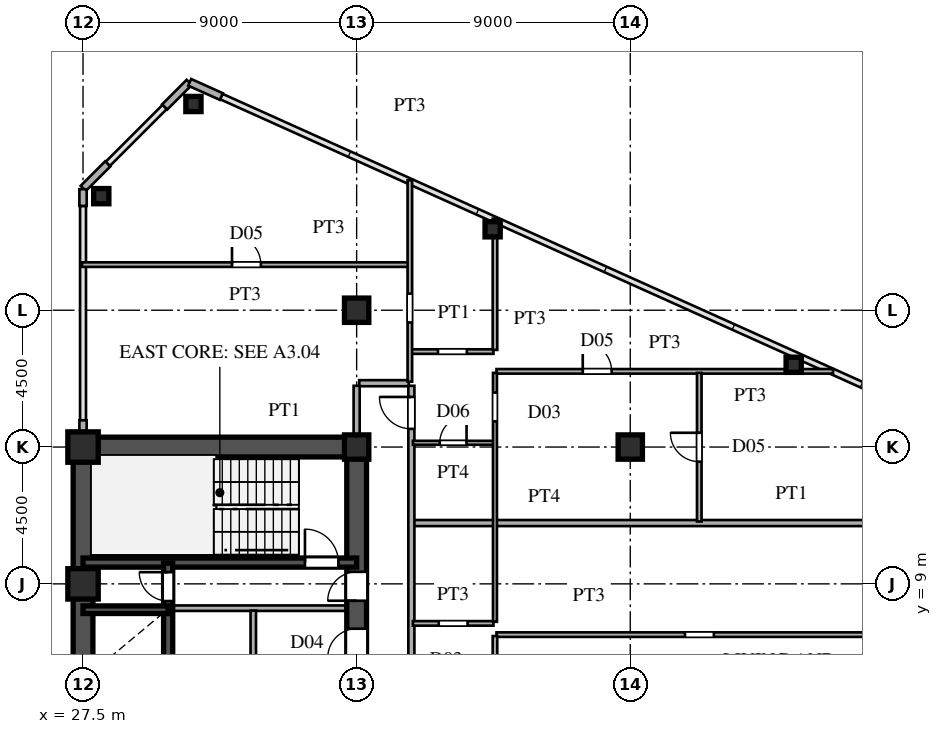
"""IFC4 building model, lengths in metres.
Left out: names, types, materials, properties, quantities, classifications, styles, units other than length and angle.
Written with IfcOpenShell. Run it as: python <this file> out.ifc"""

import sys

from ifc_helpers import new_model, si_unit, direction, frame, frame_2d, origin, origin_2d, place, context, subcontext, project, spatial, rectangle, hollow_rectangle, i_section, extrude, source, transform, mapped, element, fill, save


model = new_model("IFC4")
c1 = context("Model", 3, precision=1e-05, world=origin(), true_north=direction((0.0, 1.0)))
c2 = subcontext(c1, "Body", "Model", "MODEL_VIEW")
j1 = project(units=[si_unit("LENGTHUNIT", "METRE"), si_unit("PLANEANGLEUNIT", "RADIAN")], contexts=[c1])
p1 = place(None, origin())
s1 = spatial("IfcSite", under=j1, at=p1, CompositionType="ELEMENT")
p2 = place(p1, origin())
s2 = spatial("IfcBuilding", under=s1, at=p2, CompositionType="ELEMENT")
p3 = place(p2, frame((0.0, 0.0, 80.1)))
s3 = spatial("IfcBuildingStorey", under=s2, at=p3, CompositionType="ELEMENT", Elevation=80.1)
m1 = source(origin(), c2, "Body", "SweptSolid", [
    extrude(hollow_rectangle(XDim=1.0, YDim=1.0, WallThickness=0.042, at=origin_2d()), origin(), (0.0, 0.0, 1.0), 3.6),
])
for number, where, z_axis, x_axis in (
    (1, (27.5, 9.0, 0.0), (0.0, 0.0, 1.0), (1.0, 0.0, 0.0)),
    (2, (27.5, 13.5, 0.0), (0.0, 0.0, 1.0), (1.0, 0.0, 0.0)),
):
    element("IfcColumn", number, at=place(p3, frame(where, z_axis=z_axis, x_axis=x_axis)), inside=s3, PredefinedType="COLUMN", context=c2, shape_type="MappedRepresentation", body=[
        mapped(m1, transform((0.0, 0.0, 0.0), scale=1.0)),
    ])
m2 = source(origin(), c2, "Body", "SweptSolid", [
    extrude(i_section(OverallWidth=0.8, OverallDepth=0.8, WebThickness=0.032, FlangeThickness=0.05, at=origin_2d()), origin(), (0.0, 0.0, 1.0), 3.6),
])
for number, where, z_axis, x_axis in (
    (3, (36.5, 13.5, 0.0), (0.0, 0.0, 1.0), (1.0, 0.0, 0.0)),
    (4, (36.5, 18.0, 0.0), (0.0, 0.0, 1.0), (1.0, 0.0, 0.0)),
    (5, (45.5, 13.5, 0.0), (0.0, 0.0, 1.0), (1.0, 0.0, 0.0)),
):
    element("IfcColumn", number, at=place(p3, frame(where, z_axis=z_axis, x_axis=x_axis)), inside=s3, PredefinedType="COLUMN", context=c2, shape_type="MappedRepresentation", body=[
        mapped(m2, transform((0.0, 0.0, 0.0), scale=1.0)),
    ])
m3 = source(origin(), c2, "Body", "SweptSolid", [
    extrude(hollow_rectangle(XDim=0.5, YDim=0.5, WallThickness=0.02, at=origin_2d()), origin(), (0.0, 0.0, 1.0), 3.6),
])
for number, where, z_axis, x_axis in (
    (6, (31.131, 24.783, 0.0), (0.0, 0.0, 1.0), (1.0, 0.0, 0.0)),
    (7, (28.1, 21.751, 0.0), (0.0, 0.0, 1.0), (1.0, 0.0, 0.0)),
    (8, (40.973, 20.661, 0.0), (0.0, 0.0, 1.0), (1.0, 0.0, 0.0)),
    (9, (50.875, 16.205, 0.0), (0.0, 0.0, 1.0), (1.0, 0.0, 0.0)),
):
    element("IfcColumn", number, at=place(p3, frame(where, z_axis=z_axis, x_axis=x_axis)), inside=s3, PredefinedType="COLUMN", context=c2, shape_type="MappedRepresentation", body=[
        mapped(m3, transform((0.0, 0.0, 0.0), scale=1.0)),
    ])
p4 = place(p3, frame((32.049, 25.028, 0.0), z_axis=(0.0, 0.0, 1.0), x_axis=(-0.911929519623, 0.410346866979, 0.0)))
e10 = element("IfcWall", 10, at=p4, inside=s3, PredefinedType="SOLIDWALL", context=c2, shape_type="SweptSolid", body=[
    extrude(rectangle(XDim=1.14, YDim=0.24, at=frame_2d((0.57, 0.0))), origin(), (0.0, 0.0, 1.0), 3.38),
])
for number, where, z_axis, x_axis in (
    (11, (30.993, 25.493, 0.0), (0.0, 0.0, 1.0), (-0.707, -0.707, 0.0)),
    (12, (28.313, 22.813, 0.0), (0.0, 0.0, 1.0), (-0.707, -0.707, 0.0)),
):
    element("IfcWall", number, at=place(p3, frame(where, z_axis=z_axis, x_axis=x_axis)), inside=s3, PredefinedType="SOLIDWALL", context=c2, shape_type="SweptSolid", body=[
        extrude(rectangle(XDim=1.14, YDim=0.24, at=frame_2d((0.57, 0.0))), origin(), (0.0, 0.0, 1.0), 3.38),
    ])
p5 = place(p3, frame((27.5, 13.83, 0.0), z_axis=(0.0, 0.0, 1.0), x_axis=(0.0, 1.0, 0.0)))
e13 = element("IfcWall", 13, at=p5, inside=s3, PredefinedType="SOLIDWALL", context=c2, shape_type="SweptSolid", body=[
    extrude(rectangle(XDim=0.55, YDim=0.24, at=frame_2d((0.275, 0.0))), origin(), (0.0, 0.0, 1.0), 2.88),
])
p6 = place(p3, frame((27.5, 21.43, 0.0), z_axis=(0.0, 0.0, 1.0), x_axis=(0.0, 1.0, 0.0)))
e14 = element("IfcWall", 14, at=p6, inside=s3, PredefinedType="SOLIDWALL", context=c2, shape_type="SweptSolid", body=[
    extrude(rectangle(XDim=0.55, YDim=0.24, at=frame_2d((0.275, 0.0))), origin(), (0.0, 0.0, 1.0), 3.38),
])
p7 = place(p3, frame((27.5, 1.3, 0.0), z_axis=(0.0, 0.0, 1.0), x_axis=(0.0, 1.0, 0.0)))
e15 = element("IfcWall", 15, at=p7, inside=s3, PredefinedType="SHEAR", context=c2, shape_type="SweptSolid", body=[
    extrude(rectangle(XDim=12.2, YDim=0.65, at=frame_2d((6.1, 0.0))), origin(), (0.0, 0.0, 1.0), 3.38),
])
p8 = place(p3, frame((27.5, 13.5, 0.0), z_axis=(0.0, 0.0, 1.0), x_axis=(1.0, 0.0, 0.0)))
e16 = element("IfcWall", 16, at=p8, inside=s3, PredefinedType="SHEAR", context=c2, shape_type="SweptSolid", body=[
    extrude(rectangle(XDim=9.0, YDim=0.65, at=frame_2d((4.5, 0.0))), origin(), (0.0, 0.0, 1.0), 3.38),
])
p9 = place(p3, frame((36.5, 8.2, 0.0), z_axis=(0.0, 0.0, 1.0), x_axis=(0.0, 1.0, 0.0)))
e17 = element("IfcWall", 17, at=p9, inside=s3, PredefinedType="SHEAR", context=c2, shape_type="SweptSolid", body=[
    extrude(rectangle(XDim=5.45, YDim=0.65, at=frame_2d((2.725, 0.0))), origin(), (0.0, 0.0, 1.0), 3.38),
])
p10 = place(p9, frame((0.245, 0.0, 0.0)))
e18 = element("IfcOpeningElement", 18, at=p10, cuts=e17, PredefinedType="OPENING", context=c2, shape_type="SweptSolid", body=[
    extrude(rectangle(XDim=0.95, YDim=2.15, at=frame_2d((0.475, 1.075))), frame((0.0, 0.335, 0.0), z_axis=(0.0, -1.0, 0.0), x_axis=(1.0, 0.0, 0.0)), (0.0, 0.0, 1.0), 0.67),
])
p11 = place(p3, frame((36.5, 5.9, 0.0), z_axis=(0.0, 0.0, 1.0), x_axis=(0.0, 1.0, 0.0)))
e19 = element("IfcWall", 19, at=p11, inside=s3, PredefinedType="SHEAR", context=c2, shape_type="SweptSolid", body=[
    extrude(rectangle(XDim=2.3, YDim=0.65, at=frame_2d((1.15, 0.0))), origin(), (0.0, 0.0, 1.0), 3.38),
])
p12 = place(p11, frame((0.675, 0.0, 0.0)))
e20 = element("IfcOpeningElement", 20, at=p12, cuts=e19, PredefinedType="OPENING", context=c2, shape_type="SweptSolid", body=[
    extrude(rectangle(XDim=0.95, YDim=2.15, at=frame_2d((0.475, 1.075))), frame((0.0, 0.335, 0.0), z_axis=(0.0, -1.0, 0.0), x_axis=(1.0, 0.0, 0.0)), (0.0, 0.0, 1.0), 0.67),
])
p13 = place(p3, frame((27.5, 9.7, 0.0), z_axis=(0.0, 0.0, 1.0), x_axis=(1.0, 0.0, 0.0)))
e21 = element("IfcWall", 21, at=p13, inside=s3, PredefinedType="SHEAR", context=c2, shape_type="SweptSolid", body=[
    extrude(rectangle(XDim=9.0, YDim=0.3, at=frame_2d((4.5, 0.0))), origin(), (0.0, 0.0, 1.0), 3.38),
])
p14 = place(p13, frame((7.3, 0.0, 0.0)))
e22 = element("IfcOpeningElement", 22, at=p14, cuts=e21, PredefinedType="OPENING", context=c2, shape_type="SweptSolid", body=[
    extrude(rectangle(XDim=1.1, YDim=2.2, at=frame_2d((0.55, 1.1))), frame((0.0, 0.16, 0.0), z_axis=(0.0, -1.0, 0.0), x_axis=(1.0, 0.0, 0.0)), (0.0, 0.0, 1.0), 0.32),
])
p15 = place(p3, frame((27.5, 8.15, 0.0), z_axis=(0.0, 0.0, 1.0), x_axis=(1.0, 0.0, 0.0)))
e23 = element("IfcWall", 23, at=p15, inside=s3, PredefinedType="SHEAR", context=c2, shape_type="SweptSolid", body=[
    extrude(rectangle(XDim=2.8, YDim=0.25, at=frame_2d((1.4, 0.0))), origin(), (0.0, 0.0, 1.0), 3.38),
])
p16 = place(p3, frame((30.3, 5.9, 0.0), z_axis=(0.0, 0.0, 1.0), x_axis=(0.0, 1.0, 0.0)))
e24 = element("IfcWall", 24, at=p16, inside=s3, PredefinedType="SHEAR", context=c2, shape_type="SweptSolid", body=[
    extrude(rectangle(XDim=2.25, YDim=0.3, at=frame_2d((1.125, 0.0))), origin(), (0.0, 0.0, 1.0), 3.38),
])
p17 = place(p3, frame((30.3, 8.15, 0.0), z_axis=(0.0, 0.0, 1.0), x_axis=(0.0, 1.0, 0.0)))
e25 = element("IfcWall", 25, at=p17, inside=s3, PredefinedType="SHEAR", context=c2, shape_type="SweptSolid", body=[
    extrude(rectangle(XDim=1.53, YDim=0.3, at=frame_2d((0.765, 0.0))), origin(), (0.0, 0.0, 1.0), 3.38),
])
p18 = place(p17, frame((0.285, 0.0, 0.0)))
e26 = element("IfcOpeningElement", 26, at=p18, cuts=e25, PredefinedType="OPENING", context=c2, shape_type="SweptSolid", body=[
    extrude(rectangle(XDim=0.95, YDim=2.15, at=frame_2d((0.475, 1.075))), frame((0.0, 0.16, 0.0), z_axis=(0.0, -1.0, 0.0), x_axis=(1.0, 0.0, 0.0)), (0.0, 0.0, 1.0), 0.32),
])
p19 = place(p3, frame((30.45, 8.2, 0.0), z_axis=(0.0, 0.0, 1.0), x_axis=(1.0, 0.0, 0.0)))
e27 = element("IfcWall", 27, at=p19, inside=s3, PredefinedType="PARTITIONING", context=c2, shape_type="SweptSolid", body=[
    extrude(rectangle(XDim=5.7, YDim=0.18, at=frame_2d((2.85, 0.0))), origin(), (0.0, 0.0, 1.0), 3.38),
])
p20 = place(p3, frame((33.1, 1.38, 0.0), z_axis=(0.0, 0.0, 1.0), x_axis=(0.0, 1.0, 0.0)))
e28 = element("IfcWall", 28, at=p20, inside=s3, PredefinedType="PARTITIONING", context=c2, shape_type="SweptSolid", body=[
    extrude(rectangle(XDim=6.74, YDim=0.18, at=frame_2d((3.37, 0.0))), origin(), (0.0, 0.0, 1.0), 3.38),
])
p21 = place(p3, frame((41.1, 7.33, 0.0), z_axis=(0.0, 0.0, 1.0), x_axis=(1.0, 0.0, 0.0)))
e29 = element("IfcWall", 29, at=p21, inside=s3, PredefinedType="PARTITIONING", context=c2, shape_type="SweptSolid", body=[
    extrude(rectangle(XDim=29.775, YDim=0.15, at=frame_2d((14.887, 0.0))), origin(), (0.0, 0.0, 1.0), 3.38),
])
p22 = place(p21, frame((6.2, 0.0, 0.0)))
e30 = element("IfcOpeningElement", 30, at=p22, cuts=e29, PredefinedType="OPENING", context=c2, shape_type="SweptSolid", body=[
    extrude(rectangle(XDim=0.95, YDim=2.15, at=frame_2d((0.475, 1.075))), frame((0.0, 0.085, 0.0), z_axis=(0.0, -1.0, 0.0), x_axis=(1.0, 0.0, 0.0)), (0.0, 0.0, 1.0), 0.17),
])
p23 = place(p21, frame((15.775, 0.0, 0.0)))
e31 = element("IfcOpeningElement", 31, at=p23, cuts=e29, PredefinedType="OPENING", context=c2, shape_type="SweptSolid", body=[
    extrude(rectangle(XDim=0.95, YDim=2.15, at=frame_2d((0.475, 1.075))), frame((0.0, 0.085, 0.0), z_axis=(0.0, -1.0, 0.0), x_axis=(1.0, 0.0, 0.0)), (0.0, 0.0, 1.0), 0.17),
])
p24 = place(p3, frame((38.35, 7.7, 0.0), z_axis=(0.0, 0.0, 1.0), x_axis=(1.0, 0.0, 0.0)))
e32 = element("IfcWall", 32, at=p24, inside=s3, PredefinedType="PARTITIONING", context=c2, shape_type="SweptSolid", body=[
    extrude(rectangle(XDim=2.65, YDim=0.15, at=frame_2d((1.325, 0.0))), origin(), (0.0, 0.0, 1.0), 3.38),
])
p25 = place(p24, frame((0.85, 0.0, 0.0)))
e33 = element("IfcOpeningElement", 33, at=p25, cuts=e32, PredefinedType="OPENING", context=c2, shape_type="SweptSolid", body=[
    extrude(rectangle(XDim=0.95, YDim=2.15, at=frame_2d((0.475, 1.075))), frame((0.0, 0.085, 0.0), z_axis=(0.0, -1.0, 0.0), x_axis=(1.0, 0.0, 0.0)), (0.0, 0.0, 1.0), 0.17),
])
p26 = place(p3, frame((38.38, 11.0, 0.0), z_axis=(0.0, 0.0, 1.0), x_axis=(1.0, 0.0, 0.0)))
e34 = element("IfcWall", 34, at=p26, inside=s3, PredefinedType="PARTITIONING", context=c2, shape_type="SweptSolid", body=[
    extrude(rectangle(XDim=24.854, YDim=0.2, at=frame_2d((12.427, 0.0))), origin(), (0.0, 0.0, 1.0), 3.38),
])
p27 = place(p3, frame((38.35, 13.64, 0.0), z_axis=(0.0, 0.0, 1.0), x_axis=(1.0, 0.0, 0.0)))
e35 = element("IfcWall", 35, at=p27, inside=s3, PredefinedType="PARTITIONING", context=c2, shape_type="SweptSolid", body=[
    extrude(rectangle(XDim=2.65, YDim=0.13, at=frame_2d((1.325, 0.0))), origin(), (0.0, 0.0, 1.0), 2.68),
])
p28 = place(p27, frame((0.885, 0.0, 0.0)))
e36 = element("IfcOpeningElement", 36, at=p28, cuts=e35, PredefinedType="OPENING", context=c2, shape_type="SweptSolid", body=[
    extrude(rectangle(XDim=0.88, YDim=2.1, at=frame_2d((0.44, 1.05))), frame((0.0, 0.075, 0.0), z_axis=(0.0, -1.0, 0.0), x_axis=(1.0, 0.0, 0.0)), (0.0, 0.0, 1.0), 0.15),
])
p29 = place(p3, frame((36.585, 15.6, 0.0), z_axis=(0.0, 0.0, 1.0), x_axis=(1.0, 0.0, 0.0)))
e37 = element("IfcWall", 37, at=p29, inside=s3, PredefinedType="PARTITIONING", context=c2, shape_type="SweptSolid", body=[
    extrude(rectangle(XDim=1.63, YDim=0.2, at=frame_2d((0.815, 0.0))), origin(), (0.0, 0.0, 1.0), 3.38),
])
p30 = place(p3, frame((41.1, 15.99, 0.0), z_axis=(0.0, 0.0, 1.0), x_axis=(1.0, 0.0, 0.0)))
e38 = element("IfcWall", 38, at=p30, inside=s3, PredefinedType="PARTITIONING", context=c2, shape_type="SweptSolid", body=[
    extrude(rectangle(XDim=11.071, YDim=0.15, at=frame_2d((5.535, 0.0))), origin(), (0.0, 0.0, 1.0), 3.38),
])
p31 = place(p30, frame((2.837, 0.0, 0.0)))
e39 = element("IfcOpeningElement", 39, at=p31, cuts=e38, PredefinedType="OPENING", context=c2, shape_type="SweptSolid", body=[
    extrude(rectangle(XDim=0.95, YDim=2.15, at=frame_2d((0.475, 1.075))), frame((0.0, 0.085, 0.0), z_axis=(0.0, -1.0, 0.0), x_axis=(1.0, 0.0, 0.0)), (0.0, 0.0, 1.0), 0.17),
])
p32 = place(p3, frame((38.3, 16.64, 0.0), z_axis=(0.0, 0.0, 1.0), x_axis=(1.0, 0.0, 0.0)))
e40 = element("IfcWall", 40, at=p32, inside=s3, PredefinedType="PARTITIONING", context=c2, shape_type="SweptSolid", body=[
    extrude(rectangle(XDim=2.7, YDim=0.15, at=frame_2d((1.35, 0.0))), origin(), (0.0, 0.0, 1.0), 3.38),
])
p33 = place(p32, frame((0.875, 0.0, 0.0)))
e41 = element("IfcOpeningElement", 41, at=p33, cuts=e40, PredefinedType="OPENING", context=c2, shape_type="SweptSolid", body=[
    extrude(rectangle(XDim=0.95, YDim=2.15, at=frame_2d((0.475, 1.075))), frame((0.0, 0.085, 0.0), z_axis=(0.0, -1.0, 0.0), x_axis=(1.0, 0.0, 0.0)), (0.0, 0.0, 1.0), 0.17),
])
p34 = place(p3, frame((27.465, 19.5, 0.0), z_axis=(0.0, 0.0, 1.0), x_axis=(1.0, 0.0, 0.0)))
e42 = element("IfcWall", 42, at=p34, inside=s3, PredefinedType="PARTITIONING", context=c2, shape_type="SweptSolid", body=[
    extrude(rectangle(XDim=10.735, YDim=0.15, at=frame_2d((5.367, 0.0))), origin(), (0.0, 0.0, 1.0), 3.38),
])
p35 = place(p34, frame((4.935, 0.0, 0.0)))
e43 = element("IfcOpeningElement", 43, at=p35, cuts=e42, PredefinedType="OPENING", context=c2, shape_type="SweptSolid", body=[
    extrude(rectangle(XDim=0.95, YDim=2.15, at=frame_2d((0.475, 1.075))), frame((0.0, 0.085, 0.0), z_axis=(0.0, -1.0, 0.0), x_axis=(1.0, 0.0, 0.0)), (0.0, 0.0, 1.0), 0.17),
])
p36 = place(p3, frame((36.5, 13.83, 0.0), z_axis=(0.0, 0.0, 1.0), x_axis=(0.0, 1.0, 0.0)))
e44 = element("IfcWall", 44, at=p36, inside=s3, PredefinedType="PARTITIONING", context=c2, shape_type="SweptSolid", body=[
    extrude(rectangle(XDim=1.685, YDim=0.2, at=frame_2d((0.842, 0.0))), origin(), (0.0, 0.0, 1.0), 2.68),
])
p37 = place(p3, frame((38.25, 15.65, 0.0), z_axis=(0.0, 0.0, 1.0), x_axis=(0.0, 1.0, 0.0)))
e45 = element("IfcWall", 45, at=p37, inside=s3, PredefinedType="PARTITIONING", context=c2, shape_type="SweptSolid", body=[
    extrude(rectangle(XDim=6.623, YDim=0.15, at=frame_2d((3.312, 0.0))), origin(), (0.0, 0.0, 1.0), 3.38),
])
p38 = place(p37, frame((1.948, 0.0, 0.0)))
e46 = element("IfcOpeningElement", 46, at=p38, cuts=e45, PredefinedType="OPENING", context=c2, shape_type="SweptSolid", body=[
    extrude(rectangle(XDim=0.95, YDim=2.15, at=frame_2d((0.475, 1.075))), frame((0.0, 0.085, 0.0), z_axis=(0.0, -1.0, 0.0), x_axis=(1.0, 0.0, 0.0)), (0.0, 0.0, 1.0), 0.17),
])
p39 = place(p3, frame((38.3, -15.515, 0.0), z_axis=(0.0, 0.0, 1.0), x_axis=(0.0, 1.0, 0.0)))
e47 = element("IfcWall", 47, at=p39, inside=s3, PredefinedType="PARTITIONING", context=c2, shape_type="SweptSolid", body=[
    extrude(rectangle(XDim=31.03, YDim=0.2, at=frame_2d((15.515, 0.0))), origin(), (0.0, 0.0, 1.0), 3.38),
])
p40 = place(p39, frame((0.16, 0.0, 0.0)))
e48 = element("IfcOpeningElement", 48, at=p40, cuts=e47, PredefinedType="OPENING", context=c2, shape_type="SweptSolid", body=[
    extrude(rectangle(XDim=1.05, YDim=2.25, at=frame_2d((0.525, 1.125))), frame((0.0, 0.11, 0.0), z_axis=(0.0, -1.0, 0.0), x_axis=(1.0, 0.0, 0.0)), (0.0, 0.0, 1.0), 0.22),
])
p41 = place(p39, frame((9.067, 0.0, 0.0)))
e49 = element("IfcOpeningElement", 49, at=p41, cuts=e47, PredefinedType="OPENING", context=c2, shape_type="SweptSolid", body=[
    extrude(rectangle(XDim=1.05, YDim=2.25, at=frame_2d((0.525, 1.125))), frame((0.0, 0.11, 0.0), z_axis=(0.0, -1.0, 0.0), x_axis=(1.0, 0.0, 0.0)), (0.0, 0.0, 1.0), 0.22),
])
p42 = place(p39, frame((20.325, 0.0, 0.0)))
e50 = element("IfcOpeningElement", 50, at=p42, cuts=e47, PredefinedType="OPENING", context=c2, shape_type="SweptSolid", body=[
    extrude(rectangle(XDim=1.05, YDim=2.25, at=frame_2d((0.525, 1.125))), frame((0.0, 0.11, 0.0), z_axis=(0.0, -1.0, 0.0), x_axis=(1.0, 0.0, 0.0)), (0.0, 0.0, 1.0), 0.22),
])
p43 = place(p39, frame((29.613, 0.0, 0.0)))
e51 = element("IfcOpeningElement", 51, at=p43, cuts=e47, PredefinedType="OPENING", context=c2, shape_type="SweptSolid", body=[
    extrude(rectangle(XDim=1.05, YDim=2.25, at=frame_2d((0.525, 1.125))), frame((0.0, 0.11, 0.0), z_axis=(0.0, -1.0, 0.0), x_axis=(1.0, 0.0, 0.0)), (0.0, 0.0, 1.0), 0.22),
])
p44 = place(p3, frame((41.05, 3.717, 0.0), z_axis=(0.0, 0.0, 1.0), x_axis=(0.0, 1.0, 0.0)))
e52 = element("IfcWall", 52, at=p44, inside=s3, PredefinedType="PARTITIONING", context=c2, shape_type="SweptSolid", body=[
    extrude(rectangle(XDim=3.566, YDim=0.15, at=frame_2d((1.783, 0.0))), origin(), (0.0, 0.0, 1.0), 2.99),
])
p45 = place(p44, frame((1.308, 0.0, 0.0)))
e53 = element("IfcOpeningElement", 53, at=p45, cuts=e52, PredefinedType="OPENING", context=c2, shape_type="SweptSolid", body=[
    extrude(rectangle(XDim=0.95, YDim=2.15, at=frame_2d((0.475, 1.075))), frame((0.0, 0.085, 0.0), z_axis=(0.0, -1.0, 0.0), x_axis=(1.0, 0.0, 0.0)), (0.0, 0.0, 1.0), 0.17),
])
p46 = place(p3, frame((41.05, 7.752, 0.0), z_axis=(0.0, 0.0, 1.0), x_axis=(0.0, 1.0, 0.0)))
e54 = element("IfcWall", 54, at=p46, inside=s3, PredefinedType="PARTITIONING", context=c2, shape_type="SweptSolid", body=[
    extrude(rectangle(XDim=8.187, YDim=0.13, at=frame_2d((4.094, 0.0))), origin(), (0.0, 0.0, 1.0), 2.99),
])
p47 = place(p46, frame((6.59, 0.0, 0.0)))
e55 = element("IfcOpeningElement", 55, at=p47, cuts=e54, PredefinedType="OPENING", context=c2, shape_type="SweptSolid", body=[
    extrude(rectangle(XDim=0.95, YDim=2.15, at=frame_2d((0.475, 1.075))), frame((0.0, 0.075, 0.0), z_axis=(0.0, -1.0, 0.0), x_axis=(1.0, 0.0, 0.0)), (0.0, 0.0, 1.0), 0.15),
])
p48 = place(p3, frame((41.05, 16.695, 0.0), z_axis=(0.0, 0.0, 1.0), x_axis=(0.0, 1.0, 0.0)))
e56 = element("IfcWall", 56, at=p48, inside=s3, PredefinedType="PARTITIONING", context=c2, shape_type="SweptSolid", body=[
    extrude(rectangle(XDim=4.317, YDim=0.15, at=frame_2d((2.158, 0.0))), origin(), (0.0, 0.0, 1.0), 3.38),
])
p49 = place(p3, frame((47.77, 11.05, 0.0), z_axis=(0.0, 0.0, 1.0), x_axis=(0.0, 1.0, 0.0)))
e57 = element("IfcWall", 57, at=p49, inside=s3, PredefinedType="PARTITIONING", context=c2, shape_type="SweptSolid", body=[
    extrude(rectangle(XDim=4.889, YDim=0.15, at=frame_2d((2.444, 0.0))), origin(), (0.0, 0.0, 1.0), 3.38),
])
p50 = place(p49, frame((1.969, 0.0, 0.0)))
e58 = element("IfcOpeningElement", 58, at=p50, cuts=e57, PredefinedType="OPENING", context=c2, shape_type="SweptSolid", body=[
    extrude(rectangle(XDim=0.95, YDim=2.15, at=frame_2d((0.475, 1.075))), frame((0.0, 0.085, 0.0), z_axis=(0.0, -1.0, 0.0), x_axis=(1.0, 0.0, 0.0)), (0.0, 0.0, 1.0), 0.17),
])
m4 = source(origin(), c2, "Body", "SweptSolid", [
    extrude(rectangle(XDim=0.95, YDim=2.15, at=frame_2d((0.475, 1.075))), frame((0.0, 0.025, 0.0), z_axis=(0.0, -1.0, 0.0), x_axis=(1.0, 0.0, 0.0)), (0.0, 0.0, 1.0), 0.05),
])
p51 = place(p10, origin())
e59 = element("IfcDoor", 59, at=p51, inside=s3, OperationType="SINGLE_SWING_LEFT", PredefinedType="DOOR", context=c2, shape_type="MappedRepresentation", body=[
    mapped(m4, transform((0.0, 0.0, 0.0), scale=1.0)),
])
fill(e18, e59)
p52 = place(p12, origin())
e60 = element("IfcDoor", 60, at=p52, inside=s3, OperationType="SINGLE_SWING_LEFT", PredefinedType="DOOR", context=c2, shape_type="MappedRepresentation", body=[
    mapped(m4, transform((0.0, 0.0, 0.0), scale=1.0)),
])
fill(e20, e60)
m5 = source(origin(), c2, "Body", "SweptSolid", [
    extrude(rectangle(XDim=1.1, YDim=2.2, at=frame_2d((0.55, 1.1))), frame((0.0, 0.025, 0.0), z_axis=(0.0, -1.0, 0.0), x_axis=(1.0, 0.0, 0.0)), (0.0, 0.0, 1.0), 0.05),
])
p53 = place(p14, origin())
e61 = element("IfcDoor", 61, at=p53, inside=s3, OperationType="SINGLE_SWING_LEFT", PredefinedType="DOOR", context=c2, shape_type="MappedRepresentation", body=[
    mapped(m5, transform((0.0, 0.0, 0.0), scale=1.0)),
])
fill(e22, e61)
p54 = place(p18, origin())
e62 = element("IfcDoor", 62, at=p54, inside=s3, OperationType="SINGLE_SWING_RIGHT", PredefinedType="DOOR", context=c2, shape_type="MappedRepresentation", body=[
    mapped(m4, transform((0.0, 0.0, 0.0), scale=1.0)),
])
fill(e26, e62)
m6 = source(origin(), c2, "Body", "SweptSolid", [
    extrude(rectangle(XDim=0.88, YDim=2.1, at=frame_2d((0.44, 1.05))), frame((0.0, 0.025, 0.0), z_axis=(0.0, -1.0, 0.0), x_axis=(1.0, 0.0, 0.0)), (0.0, 0.0, 1.0), 0.05),
])
p55 = place(p28, origin())
e63 = element("IfcDoor", 63, at=p55, inside=s3, OperationType="SINGLE_SWING_RIGHT", PredefinedType="DOOR", context=c2, shape_type="MappedRepresentation", body=[
    mapped(m6, transform((0.0, 0.0, 0.0), scale=1.0)),
])
fill(e36, e63)
m7 = source(origin(), c2, "Body", "SweptSolid", [
    extrude(rectangle(XDim=0.95, YDim=2.15, at=frame_2d((0.475, 1.075))), frame((0.0, 0.025, 0.0), z_axis=(0.0, -1.0, 0.0), x_axis=(1.0, 0.0, 0.0)), (0.0, 0.0, 1.0), 0.05),
])
p56 = place(p31, origin())
e64 = element("IfcDoor", 64, at=p56, inside=s3, OperationType="SINGLE_SWING_LEFT", PredefinedType="DOOR", context=c2, shape_type="MappedRepresentation", body=[
    mapped(m7, transform((0.0, 0.0, 0.0), scale=1.0)),
])
fill(e39, e64)
p57 = place(p35, origin())
e65 = element("IfcDoor", 65, at=p57, inside=s3, OperationType="SINGLE_SWING_LEFT", PredefinedType="DOOR", context=c2, shape_type="MappedRepresentation", body=[
    mapped(m7, transform((0.0, 0.0, 0.0), scale=1.0)),
])
fill(e43, e65)
m8 = source(origin(), c2, "Body", "SweptSolid", [
    extrude(rectangle(XDim=1.05, YDim=2.25, at=frame_2d((0.525, 1.125))), frame((0.0, 0.025, 0.0), z_axis=(0.0, -1.0, 0.0), x_axis=(1.0, 0.0, 0.0)), (0.0, 0.0, 1.0), 0.05),
])
p58 = place(p43, origin())
e66 = element("IfcDoor", 66, at=p58, inside=s3, OperationType="SINGLE_SWING_RIGHT", PredefinedType="DOOR", context=c2, shape_type="MappedRepresentation", body=[
    mapped(m8, transform((0.0, 0.0, 0.0), scale=1.0)),
])
fill(e51, e66)
p59 = place(p50, origin())
e67 = element("IfcDoor", 67, at=p59, inside=s3, OperationType="SINGLE_SWING_RIGHT", PredefinedType="DOOR", context=c2, shape_type="MappedRepresentation", body=[
    mapped(m7, transform((0.0, 0.0, 0.0), scale=1.0)),
])
fill(e58, e67)
save(model, sys.argv[1])
